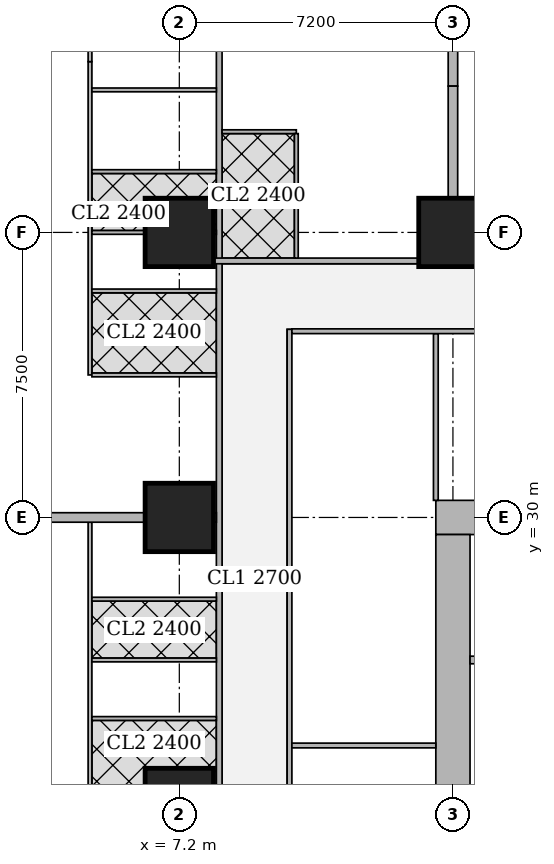
"""IFC4 building model, lengths in metres.
Left out: names, types, materials, properties, quantities, classifications, styles, units other than length and angle.
Written with IfcOpenShell. Run it as: python <this file> out.ifc"""

import sys

from ifc_helpers import new_model, si_unit, direction, frame, frame_2d, origin, origin_2d, place, context, subcontext, project, spatial, rectangle, extrude, element, fill, save


model = new_model("IFC4")
c1 = context("Model", 3, precision=1e-05, world=origin(), true_north=direction((0.0, 1.0)))
c2 = subcontext(c1, "Body", "Model", "MODEL_VIEW")
j1 = project(units=[si_unit("LENGTHUNIT", "METRE"), si_unit("PLANEANGLEUNIT", "RADIAN")], contexts=[c1])
p1 = place(None, origin())
s1 = spatial("IfcSite", under=j1, at=p1, CompositionType="ELEMENT")
p2 = place(p1, origin())
s2 = spatial("IfcBuilding", under=s1, at=p2, CompositionType="ELEMENT")
p3 = place(p2, frame((0.0, 0.0, 31.25)))
s3 = spatial("IfcBuildingStorey", under=s2, at=p3, CompositionType="ELEMENT", Elevation=31.25)
for number, where, z_axis, x_axis in (
    (1, (7.2, 22.5, 0.0), (0.0, 0.0, 1.0), (1.0, 0.0, 0.0)),
    (2, (7.2, 30.0, 0.0), (0.0, 0.0, 1.0), (1.0, 0.0, 0.0)),
    (3, (7.2, 37.5, 0.0), (0.0, 0.0, 1.0), (1.0, 0.0, 0.0)),
    (4, (14.4, 37.5, 0.0), (0.0, 0.0, 1.0), (1.0, 0.0, 0.0)),
):
    element("IfcColumn", number, at=place(p3, frame(where, z_axis=z_axis, x_axis=x_axis)), inside=s3, PredefinedType="COLUMN", context=c2, shape_type="SweptSolid", body=[
        extrude(rectangle(XDim=1.8, YDim=1.8, at=origin_2d()), origin(), (0.0, 0.0, 1.0), 3.75),
    ])
p4 = place(p3, frame((13.95, 30.0, 0.0), z_axis=(0.0, 0.0, 1.0), x_axis=(1.0, 0.0, 0.0)))
e5 = element("IfcWall", 5, at=p4, inside=s3, PredefinedType="SHEAR", context=c2, shape_type="SweptSolid", body=[
    extrude(rectangle(XDim=15.3, YDim=0.9, at=frame_2d((7.65, 0.0))), origin(), (0.0, 0.0, 1.0), 3.75),
])
p5 = place(p4, frame((4.45, 0.0, 0.0)))
e6 = element("IfcOpeningElement", 6, at=p5, cuts=e5, PredefinedType="OPENING", context=c2, shape_type="SweptSolid", body=[
    extrude(rectangle(XDim=1.8, YDim=2.1, at=frame_2d((0.9, 1.05))), frame((0.0, 0.46, 0.0), z_axis=(0.0, -1.0, 0.0), x_axis=(1.0, 0.0, 0.0)), (0.0, 0.0, 1.0), 0.92),
])
p6 = place(p4, frame((10.7, 0.0, 0.0)))
e7 = element("IfcOpeningElement", 7, at=p6, cuts=e5, PredefinedType="OPENING", context=c2, shape_type="SweptSolid", body=[
    extrude(rectangle(XDim=1.1, YDim=2.1, at=frame_2d((0.55, 1.05))), frame((0.0, 0.46, 0.0), z_axis=(0.0, -1.0, 0.0), x_axis=(1.0, 0.0, 0.0)), (0.0, 0.0, 1.0), 0.92),
])
p7 = place(p3, frame((14.4, 15.45, 0.0), z_axis=(0.0, 0.0, 1.0), x_axis=(0.0, 1.0, 0.0)))
e8 = element("IfcWall", 8, at=p7, inside=s3, PredefinedType="SHEAR", context=c2, shape_type="SweptSolid", body=[
    extrude(rectangle(XDim=14.1, YDim=0.9, at=frame_2d((7.05, 0.0))), origin(), (0.0, 0.0, 1.0), 3.75),
])
p8 = place(p3, frame((8.25, 2.426, 0.0), z_axis=(0.0, 0.0, 1.0), x_axis=(0.0, 1.0, 0.0)))
e9 = element("IfcWall", 9, at=p8, inside=s3, PredefinedType="SOLIDWALL", context=c2, shape_type="SweptSolid", body=[
    extrude(rectangle(XDim=40.173, YDim=0.15, at=frame_2d((20.086, 0.0))), origin(), (0.0, 0.0, 1.0), 3.5),
])
p9 = place(p8, frame((14.161, 0.0, 0.0)))
e10 = element("IfcOpeningElement", 10, at=p9, cuts=e9, PredefinedType="OPENING", context=c2, shape_type="SweptSolid", body=[
    extrude(rectangle(XDim=1.0, YDim=2.1, at=frame_2d((0.5, 1.05))), frame((0.0, 0.085, 0.0), z_axis=(0.0, -1.0, 0.0), x_axis=(1.0, 0.0, 0.0)), (0.0, 0.0, 1.0), 0.17),
])
p10 = place(p8, frame((17.487, 0.0, 0.0)))
e11 = element("IfcOpeningElement", 11, at=p10, cuts=e9, PredefinedType="OPENING", context=c2, shape_type="SweptSolid", body=[
    extrude(rectangle(XDim=1.0, YDim=2.1, at=frame_2d((0.5, 1.05))), frame((0.0, 0.085, 0.0), z_axis=(0.0, -1.0, 0.0), x_axis=(1.0, 0.0, 0.0)), (0.0, 0.0, 1.0), 0.17),
])
p11 = place(p8, frame((29.161, 0.0, 0.0)))
e12 = element("IfcOpeningElement", 12, at=p11, cuts=e9, PredefinedType="OPENING", context=c2, shape_type="SweptSolid", body=[
    extrude(rectangle(XDim=1.0, YDim=2.1, at=frame_2d((0.5, 1.05))), frame((0.0, 0.085, 0.0), z_axis=(0.0, -1.0, 0.0), x_axis=(1.0, 0.0, 0.0)), (0.0, 0.0, 1.0), 0.17),
])
p12 = place(p3, frame((8.1, 36.75, 0.0), z_axis=(0.0, 0.0, 1.0), x_axis=(1.0, 0.0, 0.0)))
e13 = element("IfcWall", 13, at=p12, inside=s3, PredefinedType="SOLIDWALL", context=c2, shape_type="SweptSolid", body=[
    extrude(rectangle(XDim=5.399, YDim=0.15, at=frame_2d((2.699, 0.0))), origin(), (0.0, 0.0, 1.0), 3.5),
])
p13 = place(p12, frame((3.739, 0.0, 0.0)))
e14 = element("IfcOpeningElement", 14, at=p13, cuts=e13, PredefinedType="OPENING", context=c2, shape_type="SweptSolid", body=[
    extrude(rectangle(XDim=1.0, YDim=2.1, at=frame_2d((0.5, 1.05))), frame((0.0, 0.085, 0.0), z_axis=(0.0, -1.0, 0.0), x_axis=(1.0, 0.0, 0.0)), (0.0, 0.0, 1.0), 0.17),
])
p14 = place(p3, frame((4.85, 22.5, 0.0), z_axis=(0.0, 0.0, 1.0), x_axis=(0.0, 1.0, 0.0)))
e15 = element("IfcWall", 15, at=p14, inside=s3, PredefinedType="PARTITIONING", context=c2, shape_type="SweptSolid", body=[
    extrude(rectangle(XDim=7.375, YDim=0.1, at=frame_2d((3.688, 0.0))), origin(), (0.0, 0.0, 1.0), 3.5),
])
p15 = place(p14, frame((0.655, 0.0, 0.0)))
e16 = element("IfcOpeningElement", 16, at=p15, cuts=e15, PredefinedType="OPENING", context=c2, shape_type="SweptSolid", body=[
    extrude(rectangle(XDim=0.9, YDim=2.1, at=frame_2d((0.45, 1.05))), frame((0.0, 0.06, 0.0), z_axis=(0.0, -1.0, 0.0), x_axis=(1.0, 0.0, 0.0)), (0.0, 0.0, 1.0), 0.12),
])
p16 = place(p14, frame((4.1, 0.0, 0.0)))
e17 = element("IfcOpeningElement", 17, at=p16, cuts=e15, PredefinedType="OPENING", context=c2, shape_type="SweptSolid", body=[
    extrude(rectangle(XDim=0.9, YDim=2.1, at=frame_2d((0.45, 1.05))), frame((0.0, 0.06, 0.0), z_axis=(0.0, -1.0, 0.0), x_axis=(1.0, 0.0, 0.0)), (0.0, 0.0, 1.0), 0.12),
])
p17 = place(p14, frame((2.53, 0.0, 0.0)))
e18 = element("IfcOpeningElement", 18, at=p17, cuts=e15, PredefinedType="OPENING", context=c2, shape_type="SweptSolid", body=[
    extrude(rectangle(XDim=0.9, YDim=2.1, at=frame_2d((0.45, 1.05))), frame((0.0, 0.06, 0.0), z_axis=(0.0, -1.0, 0.0), x_axis=(1.0, 0.0, 0.0)), (0.0, 0.0, 1.0), 0.12),
])
p18 = place(p14, frame((5.975, 0.0, 0.0)))
e19 = element("IfcOpeningElement", 19, at=p18, cuts=e15, PredefinedType="OPENING", context=c2, shape_type="SweptSolid", body=[
    extrude(rectangle(XDim=0.9, YDim=2.1, at=frame_2d((0.45, 1.05))), frame((0.0, 0.06, 0.0), z_axis=(0.0, -1.0, 0.0), x_axis=(1.0, 0.0, 0.0)), (0.0, 0.0, 1.0), 0.12),
])
for number, where, z_axis, x_axis in (
    (20, (4.9, 26.25, 0.0), (0.0, 0.0, 1.0), (1.0, 0.0, 0.0)),
    (21, (4.9, 24.71, 0.0), (0.0, 0.0, 1.0), (1.0, 0.0, 0.0)),
    (22, (4.9, 27.85, 0.0), (0.0, 0.0, 1.0), (1.0, 0.0, 0.0)),
):
    element("IfcWall", number, at=place(p3, frame(where, z_axis=z_axis, x_axis=x_axis)), inside=s3, PredefinedType="PARTITIONING", context=c2, shape_type="SweptSolid", body=[
        extrude(rectangle(XDim=3.275, YDim=0.1, at=frame_2d((1.638, 0.0))), origin(), (0.0, 0.0, 1.0), 3.5),
    ])
p19 = place(p3, frame((4.85, 33.75, 0.0), z_axis=(0.0, 0.0, 1.0), x_axis=(0.0, 1.0, 0.0)))
e23 = element("IfcWall", 23, at=p19, inside=s3, PredefinedType="PARTITIONING", context=c2, shape_type="SweptSolid", body=[
    extrude(rectangle(XDim=8.244, YDim=0.1, at=frame_2d((4.122, 0.0))), origin(), (0.0, 0.0, 1.0), 3.5),
])
p20 = place(p19, frame((0.655, 0.0, 0.0)))
e24 = element("IfcOpeningElement", 24, at=p20, cuts=e23, PredefinedType="OPENING", context=c2, shape_type="SweptSolid", body=[
    extrude(rectangle(XDim=0.9, YDim=2.1, at=frame_2d((0.45, 1.05))), frame((0.0, 0.06, 0.0), z_axis=(0.0, -1.0, 0.0), x_axis=(1.0, 0.0, 0.0)), (0.0, 0.0, 1.0), 0.12),
])
p21 = place(p19, frame((4.1, 0.0, 0.0)))
e25 = element("IfcOpeningElement", 25, at=p21, cuts=e23, PredefinedType="OPENING", context=c2, shape_type="SweptSolid", body=[
    extrude(rectangle(XDim=0.9, YDim=2.1, at=frame_2d((0.45, 1.05))), frame((0.0, 0.06, 0.0), z_axis=(0.0, -1.0, 0.0), x_axis=(1.0, 0.0, 0.0)), (0.0, 0.0, 1.0), 0.12),
])
p22 = place(p19, frame((2.53, 0.0, 0.0)))
e26 = element("IfcOpeningElement", 26, at=p22, cuts=e23, PredefinedType="OPENING", context=c2, shape_type="SweptSolid", body=[
    extrude(rectangle(XDim=0.9, YDim=2.1, at=frame_2d((0.45, 1.05))), frame((0.0, 0.06, 0.0), z_axis=(0.0, -1.0, 0.0), x_axis=(1.0, 0.0, 0.0)), (0.0, 0.0, 1.0), 0.12),
])
p23 = place(p19, frame((5.975, 0.0, 0.0)))
e27 = element("IfcOpeningElement", 27, at=p23, cuts=e23, PredefinedType="OPENING", context=c2, shape_type="SweptSolid", body=[
    extrude(rectangle(XDim=0.9, YDim=2.1, at=frame_2d((0.45, 1.05))), frame((0.0, 0.06, 0.0), z_axis=(0.0, -1.0, 0.0), x_axis=(1.0, 0.0, 0.0)), (0.0, 0.0, 1.0), 0.12),
])
p24 = place(p3, frame((4.85, 41.994, 0.0), z_axis=(0.0, 0.0, 1.0), x_axis=(0.0, 1.0, 0.0)))
e28 = element("IfcWall", 28, at=p24, inside=s3, PredefinedType="PARTITIONING", context=c2, shape_type="SweptSolid", body=[
    extrude(rectangle(XDim=2.901, YDim=0.1, at=frame_2d((1.451, 0.0))), origin(), (0.0, 0.0, 1.0), 2.05),
])
p25 = place(p3, frame((4.9, 33.75, 0.0), z_axis=(0.0, 0.0, 1.0), x_axis=(1.0, 0.0, 0.0)))
e29 = element("IfcWall", 29, at=p25, inside=s3, PredefinedType="PARTITIONING", context=c2, shape_type="SweptSolid", body=[
    extrude(rectangle(XDim=3.275, YDim=0.1, at=frame_2d((1.638, 0.0))), origin(), (0.0, 0.0, 1.0), 3.5),
])
p26 = place(p3, frame((4.9, 37.5, 0.0), z_axis=(0.0, 0.0, 1.0), x_axis=(1.0, 0.0, 0.0)))
e30 = element("IfcWall", 30, at=p26, inside=s3, PredefinedType="PARTITIONING", context=c2, shape_type="SweptSolid", body=[
    extrude(rectangle(XDim=1.399, YDim=0.1, at=frame_2d((0.7, 0.0))), origin(), (0.0, 0.0, 1.0), 3.5),
])
p27 = place(p3, frame((8.101, 37.5, 0.0), z_axis=(0.0, 0.0, 1.0), x_axis=(1.0, 0.0, 0.0)))
e31 = element("IfcWall", 31, at=p27, inside=s3, PredefinedType="PARTITIONING", context=c2, shape_type="SweptSolid", body=[
    extrude(rectangle(XDim=0.074, YDim=0.1, at=frame_2d((0.037, 0.0))), origin(), (0.0, 0.0, 1.0), 3.5),
])
for number, where, z_axis, x_axis in (
    (32, (4.9, 41.25, 0.0), (0.0, 0.0, 1.0), (1.0, 0.0, 0.0)),
    (33, (4.9, 35.96, 0.0), (0.0, 0.0, 1.0), (1.0, 0.0, 0.0)),
    (34, (4.9, 39.1, 0.0), (0.0, 0.0, 1.0), (1.0, 0.0, 0.0)),
):
    element("IfcWall", number, at=place(p3, frame(where, z_axis=z_axis, x_axis=x_axis)), inside=s3, PredefinedType="PARTITIONING", context=c2, shape_type="SweptSolid", body=[
        extrude(rectangle(XDim=3.275, YDim=0.1, at=frame_2d((1.638, 0.0))), origin(), (0.0, 0.0, 1.0), 3.5),
    ])
p28 = place(p3, frame((3.65, 30.0, 0.0), z_axis=(0.0, 0.0, 1.0), x_axis=(1.0, 0.0, 0.0)))
e35 = element("IfcWall", 35, at=p28, inside=s3, PredefinedType="SOLIDWALL", context=c2, shape_type="SweptSolid", body=[
    extrude(rectangle(XDim=2.649, YDim=0.25, at=frame_2d((1.325, 0.0))), origin(), (0.0, 0.0, 1.0), 3.5),
])
p29 = place(p3, frame((8.101, 30.0, 0.0), z_axis=(0.0, 0.0, 1.0), x_axis=(1.0, 0.0, 0.0)))
e36 = element("IfcWall", 36, at=p29, inside=s3, PredefinedType="SOLIDWALL", context=c2, shape_type="SweptSolid", body=[
    extrude(rectangle(XDim=0.074, YDim=0.25, at=frame_2d((0.037, 0.0))), origin(), (0.0, 0.0, 1.0), 3.5),
])
p30 = place(p3, frame((8.325, 40.15, 0.0), z_axis=(0.0, 0.0, 1.0), x_axis=(1.0, 0.0, 0.0)))
e37 = element("IfcWall", 37, at=p30, inside=s3, PredefinedType="PARTITIONING", context=c2, shape_type="SweptSolid", body=[
    extrude(rectangle(XDim=1.954, YDim=0.1, at=frame_2d((0.977, 0.0))), origin(), (0.0, 0.0, 1.0), 3.5),
])
p31 = place(p30, frame((0.475, 0.0, 0.0)))
e38 = element("IfcOpeningElement", 38, at=p31, cuts=e37, PredefinedType="OPENING", context=c2, shape_type="SweptSolid", body=[
    extrude(rectangle(XDim=0.9, YDim=2.1, at=frame_2d((0.45, 1.05))), frame((0.0, 0.06, 0.0), z_axis=(0.0, -1.0, 0.0), x_axis=(1.0, 0.0, 0.0)), (0.0, 0.0, 1.0), 0.12),
])
p32 = place(p3, frame((10.279, 36.825, 0.0), z_axis=(0.0, 0.0, 1.0), x_axis=(0.0, 1.0, 0.0)))
e39 = element("IfcWall", 39, at=p32, inside=s3, PredefinedType="PARTITIONING", context=c2, shape_type="SweptSolid", body=[
    extrude(rectangle(XDim=3.275, YDim=0.1, at=frame_2d((1.638, 0.0))), origin(), (0.0, 0.0, 1.0), 3.5),
])
p33 = place(p3, frame((14.4, 41.35, 0.0), z_axis=(0.0, 0.0, 1.0), x_axis=(0.0, 1.0, 0.0)))
e40 = element("IfcWall", 40, at=p33, inside=s3, PredefinedType="SOLIDWALL", context=c2, shape_type="SweptSolid", body=[
    extrude(rectangle(XDim=1.049, YDim=0.25, at=frame_2d((0.524, 0.0))), origin(), (0.0, 0.0, 1.0), 3.5),
])
p34 = place(p3, frame((14.4, 38.401, 0.0), z_axis=(0.0, 0.0, 1.0), x_axis=(0.0, 1.0, 0.0)))
e41 = element("IfcWall", 41, at=p34, inside=s3, PredefinedType="SOLIDWALL", context=c2, shape_type="SweptSolid", body=[
    extrude(rectangle(XDim=2.949, YDim=0.25, at=frame_2d((1.475, 0.0))), origin(), (0.0, 0.0, 1.0), 3.5),
])
p35 = place(p3, frame((10.1, 10.05, 0.0), z_axis=(0.0, 0.0, 1.0), x_axis=(0.0, 1.0, 0.0)))
e42 = element("IfcWall", 42, at=p35, inside=s3, PredefinedType="PARTITIONING", context=c2, shape_type="SweptSolid", body=[
    extrude(rectangle(XDim=24.9, YDim=0.125, at=frame_2d((12.45, 0.0))), origin(), (0.0, 0.0, 1.0), 3.5),
])
p36 = place(p35, frame((1.675, 0.0, 0.0)))
e43 = element("IfcOpeningElement", 43, at=p36, cuts=e42, PredefinedType="OPENING", context=c2, shape_type="SweptSolid", body=[
    extrude(rectangle(XDim=1.0, YDim=2.1, at=frame_2d((0.5, 1.05))), frame((0.0, 0.073, 0.0), z_axis=(0.0, -1.0, 0.0), x_axis=(1.0, 0.0, 0.0)), (0.0, 0.0, 1.0), 0.145),
])
p37 = place(p35, frame((6.85, 0.0, 0.0)))
e44 = element("IfcOpeningElement", 44, at=p37, cuts=e42, PredefinedType="OPENING", context=c2, shape_type="SweptSolid", body=[
    extrude(rectangle(XDim=1.0, YDim=2.1, at=frame_2d((0.5, 1.05))), frame((0.0, 0.073, 0.0), z_axis=(0.0, -1.0, 0.0), x_axis=(1.0, 0.0, 0.0)), (0.0, 0.0, 1.0), 0.145),
])
p38 = place(p35, frame((11.65, 0.0, 0.0)))
e45 = element("IfcOpeningElement", 45, at=p38, cuts=e42, PredefinedType="OPENING", context=c2, shape_type="SweptSolid", body=[
    extrude(rectangle(XDim=1.0, YDim=2.1, at=frame_2d((0.5, 1.05))), frame((0.0, 0.073, 0.0), z_axis=(0.0, -1.0, 0.0), x_axis=(1.0, 0.0, 0.0)), (0.0, 0.0, 1.0), 0.145),
])
p39 = place(p35, frame((18.925, 0.0, 0.0)))
e46 = element("IfcOpeningElement", 46, at=p39, cuts=e42, PredefinedType="OPENING", context=c2, shape_type="SweptSolid", body=[
    extrude(rectangle(XDim=1.0, YDim=2.1, at=frame_2d((0.5, 1.05))), frame((0.0, 0.073, 0.0), z_axis=(0.0, -1.0, 0.0), x_axis=(1.0, 0.0, 0.0)), (0.0, 0.0, 1.0), 0.145),
])
p40 = place(p3, frame((10.163, 24.0, 0.0), z_axis=(0.0, 0.0, 1.0), x_axis=(1.0, 0.0, 0.0)))
e47 = element("IfcWall", 47, at=p40, inside=s3, PredefinedType="PARTITIONING", context=c2, shape_type="SweptSolid", body=[
    extrude(rectangle(XDim=3.787, YDim=0.125, at=frame_2d((1.894, 0.0))), origin(), (0.0, 0.0, 1.0), 3.5),
])
p41 = place(p3, frame((13.95, 30.45, 0.0), z_axis=(0.0, 0.0, 1.0), x_axis=(0.0, 1.0, 0.0)))
e48 = element("IfcWall", 48, at=p41, inside=s3, PredefinedType="PARTITIONING", context=c2, shape_type="SweptSolid", body=[
    extrude(rectangle(XDim=4.387, YDim=0.125, at=frame_2d((2.193, 0.0))), origin(), (0.0, 0.0, 1.0), 3.5),
])
p42 = place(p3, frame((10.163, 34.9, 0.0), z_axis=(0.0, 0.0, 1.0), x_axis=(1.0, 0.0, 0.0)))
e49 = element("IfcWall", 49, at=p42, inside=s3, PredefinedType="PARTITIONING", context=c2, shape_type="SweptSolid", body=[
    extrude(rectangle(XDim=11.287, YDim=0.125, at=frame_2d((5.644, 0.0))), origin(), (0.0, 0.0, 1.0), 3.5),
])
p43 = place(p42, frame((7.737, 0.0, 0.0)))
e50 = element("IfcOpeningElement", 50, at=p43, cuts=e49, PredefinedType="OPENING", context=c2, shape_type="SweptSolid", body=[
    extrude(rectangle(XDim=1.8, YDim=2.1, at=frame_2d((0.9, 1.05))), frame((0.0, 0.073, 0.0), z_axis=(0.0, -1.0, 0.0), x_axis=(1.0, 0.0, 0.0)), (0.0, 0.0, 1.0), 0.145),
])
p44 = place(p3, frame((14.85, 26.25, 0.0), z_axis=(0.0, 0.0, 1.0), x_axis=(1.0, 0.0, 0.0)))
e51 = element("IfcWall", 51, at=p44, inside=s3, PredefinedType="SOLIDWALL", context=c2, shape_type="SweptSolid", body=[
    extrude(rectangle(XDim=1.95, YDim=0.2, at=frame_2d((0.975, 0.0))), origin(), (0.0, 0.0, 1.0), 3.5),
])
p45 = place(p15, origin())
e52 = element("IfcDoor", 52, at=p45, inside=s3, OperationType="SINGLE_SWING_RIGHT", PredefinedType="DOOR", context=c2, shape_type="SweptSolid", body=[
    extrude(rectangle(XDim=0.9, YDim=2.1, at=frame_2d((0.45, 1.05))), frame((0.0, 0.025, 0.0), z_axis=(0.0, -1.0, 0.0), x_axis=(1.0, 0.0, 0.0)), (0.0, 0.0, 1.0), 0.05),
])
fill(e16, e52)
p46 = place(p16, origin())
e53 = element("IfcDoor", 53, at=p46, inside=s3, OperationType="SINGLE_SWING_LEFT", PredefinedType="DOOR", context=c2, shape_type="SweptSolid", body=[
    extrude(rectangle(XDim=0.9, YDim=2.1, at=frame_2d((0.45, 1.05))), frame((0.0, 0.025, 0.0), z_axis=(0.0, -1.0, 0.0), x_axis=(1.0, 0.0, 0.0)), (0.0, 0.0, 1.0), 0.05),
])
fill(e17, e53)
p47 = place(p17, origin())
e54 = element("IfcDoor", 54, at=p47, inside=s3, OperationType="SINGLE_SWING_LEFT", PredefinedType="DOOR", context=c2, shape_type="SweptSolid", body=[
    extrude(rectangle(XDim=0.9, YDim=2.1, at=frame_2d((0.45, 1.05))), frame((0.0, 0.025, 0.0), z_axis=(0.0, -1.0, 0.0), x_axis=(1.0, 0.0, 0.0)), (0.0, 0.0, 1.0), 0.05),
])
fill(e18, e54)
p48 = place(p18, origin())
e55 = element("IfcDoor", 55, at=p48, inside=s3, OperationType="SINGLE_SWING_LEFT", PredefinedType="DOOR", context=c2, shape_type="SweptSolid", body=[
    extrude(rectangle(XDim=0.9, YDim=2.1, at=frame_2d((0.45, 1.05))), frame((0.0, 0.025, 0.0), z_axis=(0.0, -1.0, 0.0), x_axis=(1.0, 0.0, 0.0)), (0.0, 0.0, 1.0), 0.05),
])
fill(e19, e55)
p49 = place(p20, origin())
e56 = element("IfcDoor", 56, at=p49, inside=s3, OperationType="SINGLE_SWING_RIGHT", PredefinedType="DOOR", context=c2, shape_type="SweptSolid", body=[
    extrude(rectangle(XDim=0.9, YDim=2.1, at=frame_2d((0.45, 1.05))), frame((0.0, 0.025, 0.0), z_axis=(0.0, -1.0, 0.0), x_axis=(1.0, 0.0, 0.0)), (0.0, 0.0, 1.0), 0.05),
])
fill(e24, e56)
p50 = place(p21, origin())
e57 = element("IfcDoor", 57, at=p50, inside=s3, OperationType="SINGLE_SWING_RIGHT", PredefinedType="DOOR", context=c2, shape_type="SweptSolid", body=[
    extrude(rectangle(XDim=0.9, YDim=2.1, at=frame_2d((0.45, 1.05))), frame((0.0, 0.025, 0.0), z_axis=(0.0, -1.0, 0.0), x_axis=(1.0, 0.0, 0.0)), (0.0, 0.0, 1.0), 0.05),
])
fill(e25, e57)
p51 = place(p22, origin())
e58 = element("IfcDoor", 58, at=p51, inside=s3, OperationType="SINGLE_SWING_RIGHT", PredefinedType="DOOR", context=c2, shape_type="SweptSolid", body=[
    extrude(rectangle(XDim=0.9, YDim=2.1, at=frame_2d((0.45, 1.05))), frame((0.0, 0.025, 0.0), z_axis=(0.0, -1.0, 0.0), x_axis=(1.0, 0.0, 0.0)), (0.0, 0.0, 1.0), 0.05),
])
fill(e26, e58)
p52 = place(p23, origin())
e59 = element("IfcDoor", 59, at=p52, inside=s3, OperationType="SINGLE_SWING_LEFT", PredefinedType="DOOR", context=c2, shape_type="SweptSolid", body=[
    extrude(rectangle(XDim=0.9, YDim=2.1, at=frame_2d((0.45, 1.05))), frame((0.0, 0.025, 0.0), z_axis=(0.0, -1.0, 0.0), x_axis=(1.0, 0.0, 0.0)), (0.0, 0.0, 1.0), 0.05),
])
fill(e27, e59)
p53 = place(p11, origin())
e60 = element("IfcDoor", 60, at=p53, inside=s3, OperationType="SINGLE_SWING_RIGHT", PredefinedType="DOOR", context=c2, shape_type="SweptSolid", body=[
    extrude(rectangle(XDim=1.0, YDim=2.1, at=frame_2d((0.5, 1.05))), frame((0.0, 0.025, 0.0), z_axis=(0.0, -1.0, 0.0), x_axis=(1.0, 0.0, 0.0)), (0.0, 0.0, 1.0), 0.05),
])
fill(e12, e60)
p54 = place(p31, origin())
e61 = element("IfcDoor", 61, at=p54, inside=s3, OperationType="SINGLE_SWING_RIGHT", PredefinedType="DOOR", context=c2, shape_type="SweptSolid", body=[
    extrude(rectangle(XDim=0.9, YDim=2.1, at=frame_2d((0.45, 1.05))), frame((0.0, 0.025, 0.0), z_axis=(0.0, -1.0, 0.0), x_axis=(1.0, 0.0, 0.0)), (0.0, 0.0, 1.0), 0.05),
])
fill(e38, e61)
p55 = place(p13, origin())
e62 = element("IfcDoor", 62, at=p55, inside=s3, OperationType="SINGLE_SWING_RIGHT", PredefinedType="DOOR", context=c2, shape_type="SweptSolid", body=[
    extrude(rectangle(XDim=1.0, YDim=2.1, at=frame_2d((0.5, 1.05))), frame((0.0, 0.025, 0.0), z_axis=(0.0, -1.0, 0.0), x_axis=(1.0, 0.0, 0.0)), (0.0, 0.0, 1.0), 0.05),
])
fill(e14, e62)
p56 = place(p39, origin())
e63 = element("IfcDoor", 63, at=p56, inside=s3, OperationType="SINGLE_SWING_LEFT", PredefinedType="DOOR", context=c2, shape_type="SweptSolid", body=[
    extrude(rectangle(XDim=1.0, YDim=2.1, at=frame_2d((0.5, 1.05))), frame((0.0, 0.025, 0.0), z_axis=(0.0, -1.0, 0.0), x_axis=(1.0, 0.0, 0.0)), (0.0, 0.0, 1.0), 0.05),
])
fill(e46, e63)
save(model, sys.argv[1])
